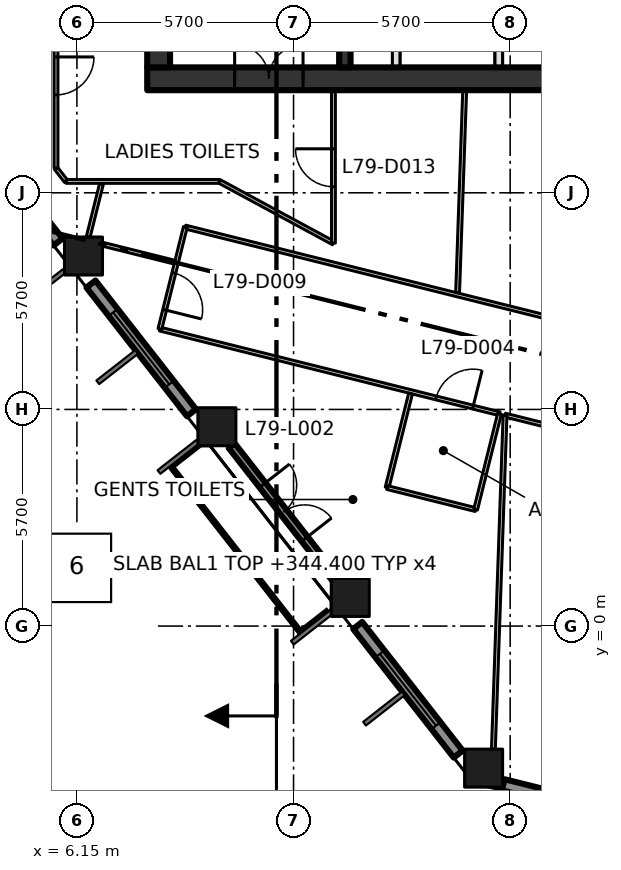
"""IFC4 building model, lengths in metres.
Left out: names, types, materials, properties, quantities, classifications, styles, units other than length and angle.
Written with IfcOpenShell. Run it as: python <this file> out.ifc"""

import sys

from ifc_helpers import new_model, si_unit, direction, frame, frame_2d, origin, origin_2d, place, context, subcontext, project, spatial, rectangle, extrude, element, fill, save


model = new_model("IFC4")
c1 = context("Model", 3, precision=1e-05, world=origin(), true_north=direction((0.0, 1.0)))
c2 = subcontext(c1, "Body", "Model", "MODEL_VIEW")
j1 = project(units=[si_unit("LENGTHUNIT", "METRE"), si_unit("PLANEANGLEUNIT", "RADIAN")], contexts=[c1])
p1 = place(None, origin())
s1 = spatial("IfcSite", under=j1, at=p1, CompositionType="ELEMENT")
p2 = place(p1, origin())
s2 = spatial("IfcBuilding", under=s1, at=p2, CompositionType="ELEMENT")
p3 = place(p2, frame((0.0, 0.0, 344.4)))
s3 = spatial("IfcBuildingStorey", under=s2, at=p3, CompositionType="ELEMENT", Elevation=344.4)
for number, where, z_axis, x_axis in (
    (1, (16.851, -3.738, 0.0), (0.0, 0.0, 1.0), (1.0, 0.0, 0.0)),
    (2, (13.342, 0.754, 0.0), (0.0, 0.0, 1.0), (1.0, 0.0, 0.0)),
    (3, (9.833, 5.245, 0.0), (0.0, 0.0, 1.0), (1.0, 0.0, 0.0)),
    (4, (6.323, 9.737, 0.0), (0.0, 0.0, 1.0), (1.0, 0.0, 0.0)),
):
    element("IfcColumn", number, at=place(p3, frame(where, z_axis=z_axis, x_axis=x_axis)), inside=s3, PredefinedType="COLUMN", context=c2, shape_type="SweptSolid", body=[
        extrude(rectangle(XDim=1.0, YDim=1.0, at=origin_2d()), origin(), (0.0, 0.0, 1.0), 4.2),
    ])
p4 = place(p3, frame((8.0, 14.4, -0.3), z_axis=(0.0, 0.0, 1.0), x_axis=(1.0, 0.0, 0.0)))
e5 = element("IfcWall", 5, at=p4, inside=s3, PredefinedType="SHEAR", context=c2, shape_type="SweptSolid", body=[
    extrude(rectangle(XDim=22.8, YDim=0.6, at=frame_2d((11.4, 0.0))), origin(), (0.0, 0.0, 1.0), 4.05),
])
p5 = place(p4, frame((2.3, 0.0, 0.3)))
e6 = element("IfcOpeningElement", 6, at=p5, cuts=e5, PredefinedType="OPENING", context=c2, shape_type="SweptSolid", body=[
    extrude(rectangle(XDim=1.8, YDim=2.1, at=frame_2d((0.9, 1.05))), frame((0.0, 0.31, 0.0), z_axis=(0.0, -1.0, 0.0), x_axis=(1.0, 0.0, 0.0)), (0.0, 0.0, 1.0), 0.62),
])
p6 = place(p3, frame((8.3, 14.7, -0.3), z_axis=(0.0, 0.0, 1.0), x_axis=(0.0, 1.0, 0.0)))
e7 = element("IfcWall", 7, at=p6, inside=s3, PredefinedType="SHEAR", context=c2, shape_type="SweptSolid", body=[
    extrude(rectangle(XDim=21.0, YDim=0.6, at=frame_2d((10.5, 0.0))), origin(), (0.0, 0.0, 1.0), 4.05),
])
p7 = place(p3, frame((13.2, 14.7, 0.0), z_axis=(0.0, 0.0, 1.0), x_axis=(0.0, 1.0, 0.0)))
e8 = element("IfcWall", 8, at=p7, inside=s3, PredefinedType="SHEAR", context=c2, shape_type="SweptSolid", body=[
    extrude(rectangle(XDim=21.0, YDim=0.3, at=frame_2d((10.5, 0.0))), origin(), (0.0, 0.0, 1.0), 3.75),
])
p8 = place(p7, frame((3.6, 0.0, 0.0)))
e9 = element("IfcOpeningElement", 9, at=p8, cuts=e8, PredefinedType="OPENING", context=c2, shape_type="SweptSolid", body=[
    extrude(rectangle(XDim=1.8, YDim=2.1, at=frame_2d((0.9, 1.05))), frame((0.0, 0.16, 0.0), z_axis=(0.0, -1.0, 0.0), x_axis=(1.0, 0.0, 0.0)), (0.0, 0.0, 1.0), 0.32),
])
p9 = place(p7, frame((11.7, 0.0, 0.0)))
e10 = element("IfcOpeningElement", 10, at=p9, cuts=e8, PredefinedType="OPENING", context=c2, shape_type="SweptSolid", body=[
    extrude(rectangle(XDim=1.2, YDim=2.1, at=frame_2d((0.6, 1.05))), frame((0.0, 0.16, 0.0), z_axis=(0.0, -1.0, 0.0), x_axis=(1.0, 0.0, 0.0)), (0.0, 0.0, 1.0), 0.32),
])
for number, where, z_axis, x_axis in (
    (11, (14.55, 14.7, 0.0), (0.0, 0.0, 1.0), (0.0, 1.0, 0.0)),
    (12, (17.25, 14.7, 0.0), (0.0, 0.0, 1.0), (0.0, 1.0, 0.0)),
):
    element("IfcWall", number, at=place(p3, frame(where, z_axis=z_axis, x_axis=x_axis)), inside=s3, PredefinedType="SOLIDWALL", context=c2, shape_type="SweptSolid", body=[
        extrude(rectangle(XDim=2.9, YDim=0.2, at=frame_2d((1.45, 0.0))), origin(), (0.0, 0.0, 1.0), 3.75),
    ])
p10 = place(p3, frame((3.01, 13.491, 0.0), z_axis=(0.0, 0.0, 1.0), x_axis=(0.615713519567, -0.787970089421, 0.0)))
e13 = element("IfcWall", 13, at=p10, inside=s3, PredefinedType="SOLIDWALL", context=c2, shape_type="SweptSolid", body=[
    extrude(rectangle(XDim=4.296, YDim=0.3, at=frame_2d((2.148, 0.0))), origin(), (0.0, 0.0, 1.0), 3.05),
])
p11 = place(p10, frame((0.948, 0.0, 0.8)))
e14 = element("IfcOpeningElement", 14, at=p11, cuts=e13, PredefinedType="OPENING", context=c2, shape_type="SweptSolid", body=[
    extrude(rectangle(XDim=2.4, YDim=1.45, at=frame_2d((1.2, 0.725))), frame((0.0, 0.16, 0.0), z_axis=(0.0, -1.0, 0.0), x_axis=(1.0, 0.0, 0.0)), (0.0, 0.0, 1.0), 0.32),
])
p12 = place(p3, frame((6.519, 9.0, 0.0), z_axis=(0.0, 0.0, 1.0), x_axis=(0.615634121154, -0.788032124263, 0.0)))
e15 = element("IfcWall", 15, at=p12, inside=s3, PredefinedType="SOLIDWALL", context=c2, shape_type="SweptSolid", body=[
    extrude(rectangle(XDim=4.298, YDim=0.3, at=frame_2d((2.149, 0.0))), origin(), (0.0, 0.0, 1.0), 3.05),
])
p13 = place(p12, frame((0.949, 0.0, 0.8)))
e16 = element("IfcOpeningElement", 16, at=p13, cuts=e15, PredefinedType="OPENING", context=c2, shape_type="SweptSolid", body=[
    extrude(rectangle(XDim=2.4, YDim=1.45, at=frame_2d((1.2, 0.725))), frame((0.0, 0.16, 0.0), z_axis=(0.0, -1.0, 0.0), x_axis=(1.0, 0.0, 0.0)), (0.0, 0.0, 1.0), 0.32),
])
p14 = place(p3, frame((10.224, 4.745, 0.0), z_axis=(0.0, 0.0, 1.0), x_axis=(0.615545644418, -0.788101236922, 0.0)))
e17 = element("IfcWall", 17, at=p14, inside=s3, PredefinedType="SOLIDWALL", context=c2, shape_type="SweptSolid", body=[
    extrude(rectangle(XDim=4.43, YDim=0.2, at=frame_2d((2.215, 0.0))), origin(), (0.0, 0.0, 1.0), 3.05),
])
p15 = place(p14, frame((1.315, 0.0, 0.0)))
e18 = element("IfcOpeningElement", 18, at=p15, cuts=e17, PredefinedType="OPENING", context=c2, shape_type="SweptSolid", body=[
    extrude(rectangle(XDim=1.8, YDim=2.9, at=frame_2d((0.9, 1.45))), frame((0.0, 0.11, 0.0), z_axis=(0.0, -1.0, 0.0), x_axis=(1.0, 0.0, 0.0)), (0.0, 0.0, 1.0), 0.22),
])
p16 = place(p3, frame((8.89, 4.292, 0.0), z_axis=(0.0, 0.0, 1.0), x_axis=(0.615636085037, -0.788030590016, 0.0)))
e19 = element("IfcWall", 19, at=p16, inside=s3, PredefinedType="SOLIDWALL", context=c2, shape_type="SweptSolid", body=[
    extrude(rectangle(XDim=5.359, YDim=0.4, at=frame_2d((2.679, 0.0))), origin(), (0.0, 0.0, 1.0), 0.3),
])
p17 = place(p3, frame((13.538, 0.016, 0.0), z_axis=(0.0, 0.0, 1.0), x_axis=(0.615713519567, -0.787970089421, 0.0)))
e20 = element("IfcWall", 20, at=p17, inside=s3, PredefinedType="SOLIDWALL", context=c2, shape_type="SweptSolid", body=[
    extrude(rectangle(XDim=4.296, YDim=0.3, at=frame_2d((2.148, 0.0))), origin(), (0.0, 0.0, 1.0), 3.05),
])
p18 = place(p17, frame((0.948, 0.0, 0.8)))
e21 = element("IfcOpeningElement", 21, at=p18, cuts=e20, PredefinedType="OPENING", context=c2, shape_type="SweptSolid", body=[
    extrude(rectangle(XDim=2.4, YDim=1.45, at=frame_2d((1.2, 0.725))), frame((0.0, 0.16, 0.0), z_axis=(0.0, -1.0, 0.0), x_axis=(1.0, 0.0, 0.0)), (0.0, 0.0, 1.0), 0.32),
])
p19 = place(p3, frame((17.367, -4.176, 0.0), z_axis=(0.0, 0.0, 1.0), x_axis=(0.970327846266, -0.241793032904, 0.0)))
e22 = element("IfcWall", 22, at=p19, inside=s3, PredefinedType="SOLIDWALL", context=c2, shape_type="SweptSolid", body=[
    extrude(rectangle(XDim=4.487, YDim=0.3, at=frame_2d((2.244, 0.0))), origin(), (0.0, 0.0, 1.0), 3.05),
])
p20 = place(p19, frame((1.044, 0.0, 0.8)))
e23 = element("IfcOpeningElement", 23, at=p20, cuts=e22, PredefinedType="OPENING", context=c2, shape_type="SweptSolid", body=[
    extrude(rectangle(XDim=2.4, YDim=1.45, at=frame_2d((1.2, 0.725))), frame((0.0, 0.16, 0.0), z_axis=(0.0, -1.0, 0.0), x_axis=(1.0, 0.0, 0.0)), (0.0, 0.0, 1.0), 0.32),
])
p21 = place(p3, frame((5.6, 12.044, 0.0), z_axis=(0.0, 0.0, 1.0), x_axis=(0.614328236968, -0.789050579661, 0.0)))
e24 = element("IfcWall", 24, at=p21, inside=s3, PredefinedType="PARTITIONING", context=c2, shape_type="SweptSolid", body=[
    extrude(rectangle(XDim=0.436, YDim=0.1, at=frame_2d((0.218, 0.0))), origin(), (0.0, 0.0, 1.0), 3.75),
])
p22 = place(p3, frame((5.6, 39.3, 0.0), z_axis=(0.0, 0.0, 1.0), x_axis=(0.0, -1.0, 0.0)))
e25 = element("IfcWall", 25, at=p22, inside=s3, PredefinedType="PARTITIONING", context=c2, shape_type="SweptSolid", body=[
    extrude(rectangle(XDim=27.256, YDim=0.1, at=frame_2d((13.628, 0.0))), origin(), (0.0, 0.0, 1.0), 3.75),
])
p23 = place(p22, frame((24.325, 0.0, 0.0)))
e26 = element("IfcOpeningElement", 26, at=p23, cuts=e25, PredefinedType="OPENING", context=c2, shape_type="SweptSolid", body=[
    extrude(rectangle(XDim=1.0, YDim=2.1, at=frame_2d((0.5, 1.05))), frame((0.0, 0.06, 0.0), z_axis=(0.0, -1.0, 0.0), x_axis=(1.0, 0.0, 0.0)), (0.0, 0.0, 1.0), 0.12),
])
p24 = place(p22, frame((12.825, 0.0, 0.0)))
e27 = element("IfcOpeningElement", 27, at=p24, cuts=e25, PredefinedType="OPENING", context=c2, shape_type="SweptSolid", body=[
    extrude(rectangle(XDim=1.0, YDim=2.1, at=frame_2d((0.5, 1.05))), frame((0.0, 0.06, 0.0), z_axis=(0.0, -1.0, 0.0), x_axis=(1.0, 0.0, 0.0)), (0.0, 0.0, 1.0), 0.12),
])
p25 = place(p3, frame((5.868, 11.7, 0.0), z_axis=(0.0, 0.0, 1.0), x_axis=(1.0, 0.0, 0.0)))
e28 = element("IfcWall", 28, at=p25, inside=s3, PredefinedType="PARTITIONING", context=c2, shape_type="SweptSolid", body=[
    extrude(rectangle(XDim=4.032, YDim=0.1, at=frame_2d((2.016, 0.0))), origin(), (0.0, 0.0, 1.0), 3.75),
])
p26 = place(p3, frame((8.333, 7.815, 0.0), z_axis=(0.0, 0.0, 1.0), x_axis=(0.970301331289, -0.241899414012, 0.0)))
e29 = element("IfcWall", 29, at=p26, inside=s3, PredefinedType="PARTITIONING", context=c2, shape_type="SweptSolid", body=[
    extrude(rectangle(XDim=9.21, YDim=0.1, at=frame_2d((4.605, 0.0))), origin(), (0.0, 0.0, 1.0), 3.75),
])
p27 = place(p26, frame((7.49, 0.0, 0.0)))
e30 = element("IfcOpeningElement", 30, at=p27, cuts=e29, PredefinedType="OPENING", context=c2, shape_type="SweptSolid", body=[
    extrude(rectangle(XDim=1.0, YDim=2.1, at=frame_2d((0.5, 1.05))), frame((0.0, 0.06, 0.0), z_axis=(0.0, -1.0, 0.0), x_axis=(1.0, 0.0, 0.0)), (0.0, 0.0, 1.0), 0.12),
])
p28 = place(p3, frame((9.002, 10.499, 0.0), z_axis=(0.0, 0.0, 1.0), x_axis=(0.970298340477, -0.241911410372, 0.0)))
e31 = element("IfcWall", 31, at=p28, inside=s3, PredefinedType="PARTITIONING", context=c2, shape_type="SweptSolid", body=[
    extrude(rectangle(XDim=19.88, YDim=0.1, at=frame_2d((9.94, 0.0))), origin(), (0.0, 0.0, 1.0), 3.75),
])
p29 = place(p28, frame((12.749, 0.0, 0.0)))
e32 = element("IfcOpeningElement", 32, at=p29, cuts=e31, PredefinedType="OPENING", context=c2, shape_type="SweptSolid", body=[
    extrude(rectangle(XDim=1.8, YDim=2.1, at=frame_2d((0.9, 1.05))), frame((0.0, 0.06, 0.0), z_axis=(0.0, -1.0, 0.0), x_axis=(1.0, 0.0, 0.0)), (0.0, 0.0, 1.0), 0.12),
])
p30 = place(p3, frame((9.002, 10.499, 0.0), z_axis=(0.0, 0.0, 1.0), x_axis=(-0.2418294893, -0.970318761081, 0.0)))
e33 = element("IfcWall", 33, at=p30, inside=s3, PredefinedType="PARTITIONING", context=c2, shape_type="SweptSolid", body=[
    extrude(rectangle(XDim=2.766, YDim=0.1, at=frame_2d((1.383, 0.0))), origin(), (0.0, 0.0, 1.0), 3.75),
])
p31 = place(p30, frame((1.244, 0.0, 0.0)))
e34 = element("IfcOpeningElement", 34, at=p31, cuts=e33, PredefinedType="OPENING", context=c2, shape_type="SweptSolid", body=[
    extrude(rectangle(XDim=1.0, YDim=2.1, at=frame_2d((0.5, 1.05))), frame((0.0, 0.06, 0.0), z_axis=(0.0, -1.0, 0.0), x_axis=(1.0, 0.0, 0.0)), (0.0, 0.0, 1.0), 0.12),
])
p32 = place(p3, frame((9.9, 11.7, 0.0), z_axis=(0.0, 0.0, 1.0), x_axis=(0.87965147249, -0.475618846291, 0.0)))
e35 = element("IfcWall", 35, at=p32, inside=s3, PredefinedType="PARTITIONING", context=c2, shape_type="SweptSolid", body=[
    extrude(rectangle(XDim=3.41, YDim=0.1, at=frame_2d((1.705, 0.0))), origin(), (0.0, 0.0, 1.0), 3.75),
])
p33 = place(p3, frame((12.9, 10.078, 0.0), z_axis=(0.0, 0.0, 1.0), x_axis=(0.0, 1.0, 0.0)))
e36 = element("IfcWall", 36, at=p33, inside=s3, PredefinedType="PARTITIONING", context=c2, shape_type="SweptSolid", body=[
    extrude(rectangle(XDim=4.022, YDim=0.1, at=frame_2d((2.011, 0.0))), origin(), (0.0, 0.0, 1.0), 3.75),
])
p34 = place(p33, frame((1.48, 0.0, 0.0)))
e37 = element("IfcOpeningElement", 37, at=p34, cuts=e36, PredefinedType="OPENING", context=c2, shape_type="SweptSolid", body=[
    extrude(rectangle(XDim=1.0, YDim=2.1, at=frame_2d((0.5, 1.05))), frame((0.0, 0.06, 0.0), z_axis=(0.0, -1.0, 0.0), x_axis=(1.0, 0.0, 0.0)), (0.0, 0.0, 1.0), 0.12),
])
p35 = place(p3, frame((17.415, 5.551, 0.0), z_axis=(0.0, 0.0, 1.0), x_axis=(0.970298198748, -0.241911978838, 0.0)))
e38 = element("IfcWall", 38, at=p35, inside=s3, PredefinedType="PARTITIONING", context=c2, shape_type="SweptSolid", body=[
    extrude(rectangle(XDim=1.658, YDim=0.1, at=frame_2d((0.829, 0.0))), origin(), (0.0, 0.0, 1.0), 3.75),
])
p36 = place(p3, frame((6.797, 11.638, 0.0), z_axis=(0.0, 0.0, 1.0), x_axis=(-0.242456058691, -0.970162388265, 0.0)))
e39 = element("IfcWall", 39, at=p36, inside=s3, PredefinedType="PARTITIONING", context=c2, shape_type="SweptSolid", body=[
    extrude(rectangle(XDim=1.444, YDim=0.1, at=frame_2d((0.722, 0.0))), origin(), (0.0, 0.0, 1.0), 3.75),
])
p37 = place(p3, frame((8.72, 9.575, 0.0), z_axis=(0.0, 0.0, 1.0), x_axis=(-0.970274576003, 0.242006708918, 0.0)))
e40 = element("IfcWall", 40, at=p37, inside=s3, PredefinedType="PARTITIONING", context=c2, shape_type="SweptSolid", body=[
    extrude(rectangle(XDim=1.955, YDim=0.1, at=frame_2d((0.978, 0.0))), origin(), (0.0, 0.0, 1.0), 3.75),
])
p38 = place(p3, frame((14.312, 3.645, 0.0), z_axis=(0.0, 0.0, 1.0), x_axis=(0.241972320765, 0.970283152478, 0.0)))
e41 = element("IfcWall", 41, at=p38, inside=s3, PredefinedType="PARTITIONING", context=c2, shape_type="SweptSolid", body=[
    extrude(rectangle(XDim=2.55, YDim=0.1, at=frame_2d((1.275, 0.0))), origin(), (0.0, 0.0, 1.0), 3.75),
])
p39 = place(p3, frame((16.167, 8.775, 0.0), z_axis=(0.0, 0.0, 1.0), x_axis=(0.034913599617, 0.999390334435, 0.0)))
e42 = element("IfcWall", 42, at=p39, inside=s3, PredefinedType="PARTITIONING", context=c2, shape_type="SweptSolid", body=[
    extrude(rectangle(XDim=5.328, YDim=0.1, at=frame_2d((2.664, 0.0))), origin(), (0.0, 0.0, 1.0), 3.75),
])
p40 = place(p3, frame((16.641, 3.064, 0.0), z_axis=(0.0, 0.0, 1.0), x_axis=(-0.970262034576, 0.242056985565, 0.0)))
e43 = element("IfcWall", 43, at=p40, inside=s3, PredefinedType="PARTITIONING", context=c2, shape_type="SweptSolid", body=[
    extrude(rectangle(XDim=2.4, YDim=0.1, at=frame_2d((1.2, 0.0))), origin(), (0.0, 0.0, 1.0), 3.75),
])
p41 = place(p3, frame((17.109, -3.238, 0.0), z_axis=(0.0, 0.0, 1.0), x_axis=(0.034812219839, 0.999393870979, 0.0)))
e44 = element("IfcWall", 44, at=p41, inside=s3, PredefinedType="PARTITIONING", context=c2, shape_type="SweptSolid", body=[
    extrude(rectangle(XDim=8.794, YDim=0.1, at=frame_2d((4.397, 0.0))), origin(), (0.0, 0.0, 1.0), 3.75),
])
p42 = place(p3, frame((17.27, 5.587, 0.0), z_axis=(0.0, 0.0, 1.0), x_axis=(-0.241872782222, -0.970307970296, 0.0)))
e45 = element("IfcWall", 45, at=p42, inside=s3, PredefinedType="PARTITIONING", context=c2, shape_type="SweptSolid", body=[
    extrude(rectangle(XDim=2.6, YDim=0.1, at=frame_2d((1.3, 0.0))), origin(), (0.0, 0.0, 1.0), 3.75),
])
p43 = place(p5, origin())
e46 = element("IfcDoor", 46, at=p43, inside=s3, OperationType="DOUBLE_DOOR_SINGLE_SWING", PredefinedType="DOOR", context=c2, shape_type="SweptSolid", body=[
    extrude(rectangle(XDim=1.8, YDim=2.1, at=frame_2d((0.9, 1.05))), frame((0.0, 0.025, 0.0), z_axis=(0.0, -1.0, 0.0), x_axis=(1.0, 0.0, 0.0)), (0.0, 0.0, 1.0), 0.05),
])
fill(e6, e46)
p44 = place(p13, origin())
e47 = element("IfcWindow", 47, at=p44, inside=s3, PartitioningType="DOUBLE_PANEL_VERTICAL", PredefinedType="WINDOW", context=c2, shape_type="SweptSolid", body=[
    extrude(rectangle(XDim=2.4, YDim=1.45, at=frame_2d((1.2, 0.725))), frame((0.0, 0.03, 0.0), z_axis=(0.0, -1.0, 0.0), x_axis=(1.0, 0.0, 0.0)), (0.0, 0.0, 1.0), 0.06),
])
fill(e16, e47)
p45 = place(p15, origin())
e48 = element("IfcDoor", 48, at=p45, inside=s3, OperationType="DOUBLE_DOOR_SINGLE_SWING", PredefinedType="DOOR", context=c2, shape_type="SweptSolid", body=[
    extrude(rectangle(XDim=1.8, YDim=2.9, at=frame_2d((0.9, 1.45))), frame((0.0, 0.025, 0.0), z_axis=(0.0, -1.0, 0.0), x_axis=(1.0, 0.0, 0.0)), (0.0, 0.0, 1.0), 0.05),
])
fill(e18, e48)
p46 = place(p18, origin())
e49 = element("IfcWindow", 49, at=p46, inside=s3, PartitioningType="DOUBLE_PANEL_VERTICAL", PredefinedType="WINDOW", context=c2, shape_type="SweptSolid", body=[
    extrude(rectangle(XDim=2.4, YDim=1.45, at=frame_2d((1.2, 0.725))), frame((0.0, 0.03, 0.0), z_axis=(0.0, -1.0, 0.0), x_axis=(1.0, 0.0, 0.0)), (0.0, 0.0, 1.0), 0.06),
])
fill(e21, e49)
p47 = place(p27, origin())
e50 = element("IfcDoor", 50, at=p47, inside=s3, OperationType="SINGLE_SWING_RIGHT", PredefinedType="DOOR", context=c2, shape_type="SweptSolid", body=[
    extrude(rectangle(XDim=1.0, YDim=2.1, at=frame_2d((0.5, 1.05))), frame((0.0, 0.025, 0.0), z_axis=(0.0, -1.0, 0.0), x_axis=(1.0, 0.0, 0.0)), (0.0, 0.0, 1.0), 0.05),
])
fill(e30, e50)
p48 = place(p31, origin())
e51 = element("IfcDoor", 51, at=p48, inside=s3, OperationType="SINGLE_SWING_RIGHT", PredefinedType="DOOR", context=c2, shape_type="SweptSolid", body=[
    extrude(rectangle(XDim=1.0, YDim=2.1, at=frame_2d((0.5, 1.05))), frame((0.0, 0.025, 0.0), z_axis=(0.0, -1.0, 0.0), x_axis=(1.0, 0.0, 0.0)), (0.0, 0.0, 1.0), 0.05),
])
fill(e34, e51)
p49 = place(p23, origin())
e52 = element("IfcDoor", 52, at=p49, inside=s3, OperationType="SINGLE_SWING_LEFT", PredefinedType="DOOR", context=c2, shape_type="SweptSolid", body=[
    extrude(rectangle(XDim=1.0, YDim=2.1, at=frame_2d((0.5, 1.05))), frame((0.0, 0.025, 0.0), z_axis=(0.0, -1.0, 0.0), x_axis=(1.0, 0.0, 0.0)), (0.0, 0.0, 1.0), 0.05),
])
fill(e26, e52)
p50 = place(p34, origin())
e53 = element("IfcDoor", 53, at=p50, inside=s3, OperationType="SINGLE_SWING_RIGHT", PredefinedType="DOOR", context=c2, shape_type="SweptSolid", body=[
    extrude(rectangle(XDim=1.0, YDim=2.1, at=frame_2d((0.5, 1.05))), frame((0.0, 0.025, 0.0), z_axis=(0.0, -1.0, 0.0), x_axis=(1.0, 0.0, 0.0)), (0.0, 0.0, 1.0), 0.05),
])
fill(e37, e53)
save(model, sys.argv[1])
